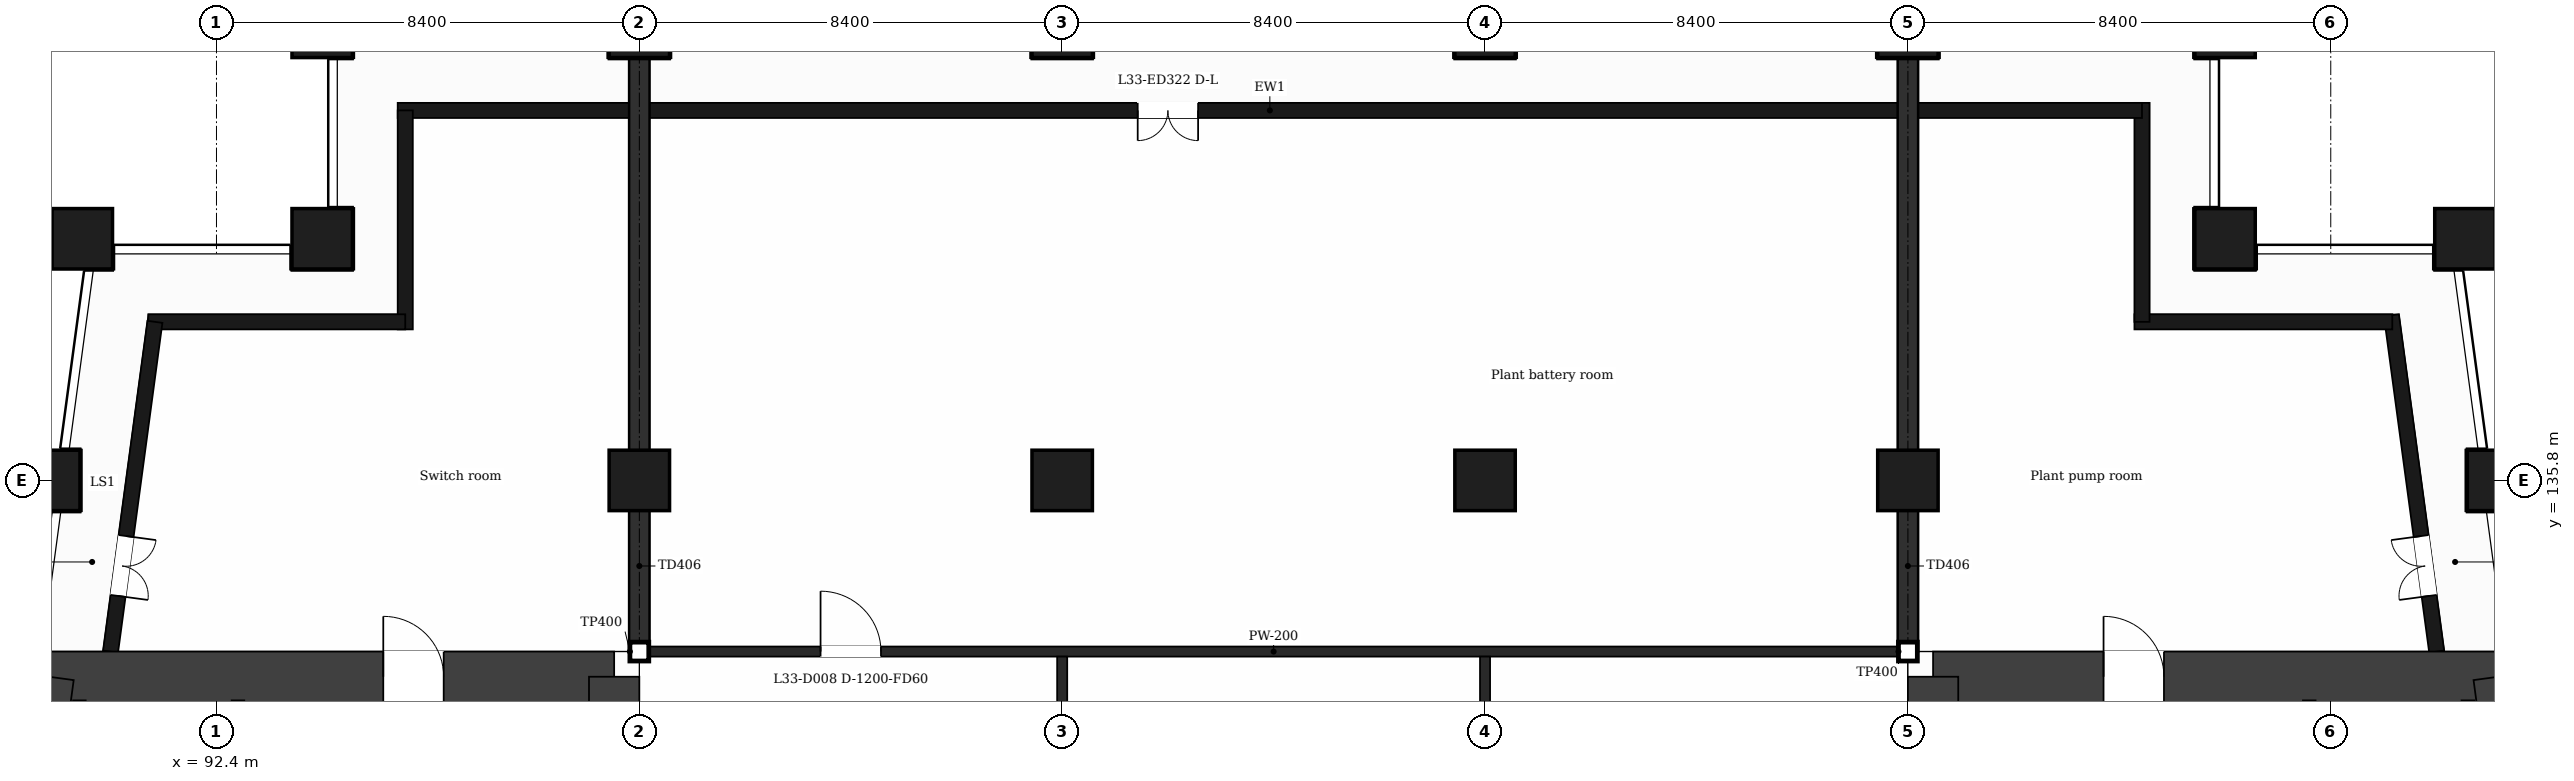
"""IFC4 building model, lengths in metres.
Left out: names, types, materials, properties, quantities, classifications, styles, units other than length and angle.
Written with IfcOpenShell. Run it as: python <this file> out.ifc"""

import sys

from ifc_helpers import new_model, si_unit, direction, frame, frame_2d, origin, origin_2d, place, context, subcontext, project, spatial, rectangle, extrude, element, fill, save


model = new_model("IFC4")
c1 = context("Model", 3, precision=1e-05, world=origin(), true_north=direction((0.0, 1.0)))
c2 = subcontext(c1, "Body", "Model", "MODEL_VIEW")
j1 = project(units=[si_unit("LENGTHUNIT", "METRE"), si_unit("PLANEANGLEUNIT", "RADIAN")], contexts=[c1])
p1 = place(None, origin())
s1 = spatial("IfcSite", under=j1, at=p1, CompositionType="ELEMENT")
p2 = place(p1, origin())
s2 = spatial("IfcBuilding", under=s1, at=p2, CompositionType="ELEMENT")
p3 = place(p2, frame((0.0, 0.0, 142.8)))
s3 = spatial("IfcBuildingStorey", under=s2, at=p3, CompositionType="ELEMENT", Elevation=142.8)
p4 = place(p3, frame((89.068, 131.9, 0.0), z_axis=(0.0, 0.0, 1.0), x_axis=(1.0, 0.0, 0.0)))
e1 = element("IfcWall", 1, at=p4, inside=s3, PredefinedType="SHEAR", context=c2, shape_type="SweptSolid", body=[
    extrude(rectangle(XDim=11.232, YDim=1.0, at=frame_2d((5.616, 0.0))), origin(), (0.0, 0.0, 1.0), 5.0),
])
p5 = place(p4, frame((6.646, 0.0, 0.0)))
e2 = element("IfcOpeningElement", 2, at=p5, cuts=e1, PredefinedType="OPENING", context=c2, shape_type="SweptSolid", body=[
    extrude(rectangle(XDim=1.2, YDim=2.1, at=frame_2d((0.6, 1.05))), frame((0.0, 0.51, 0.0), z_axis=(0.0, -1.0, 0.0), x_axis=(1.0, 0.0, 0.0)), (0.0, 0.0, 1.0), 1.02),
])
p6 = place(p3, frame((100.3, 131.9, 0.0), z_axis=(0.0, 0.0, 1.0), x_axis=(0.0, -1.0, 0.0)))
e3 = element("IfcWall", 3, at=p6, inside=s3, PredefinedType="SHEAR", context=c2, shape_type="SweptSolid", body=[
    extrude(rectangle(XDim=21.0, YDim=1.0, at=frame_2d((10.5, 0.0))), origin(), (0.0, 0.0, 1.0), 5.0),
])
p7 = place(p6, frame((18.7, 0.0, 0.0)))
e4 = element("IfcOpeningElement", 4, at=p7, cuts=e3, PredefinedType="OPENING", context=c2, shape_type="SweptSolid", body=[
    extrude(rectangle(XDim=1.2, YDim=2.1, at=frame_2d((0.6, 1.05))), frame((0.0, 0.51, 0.0), z_axis=(0.0, -1.0, 0.0), x_axis=(1.0, 0.0, 0.0)), (0.0, 0.0, 1.0), 1.02),
])
p8 = place(p6, frame((7.75, 0.0, 0.0)))
e5 = element("IfcOpeningElement", 5, at=p8, cuts=e3, PredefinedType="OPENING", context=c2, shape_type="SweptSolid", body=[
    extrude(rectangle(XDim=1.4, YDim=2.1, at=frame_2d((0.7, 1.05))), frame((0.0, 0.51, 0.0), z_axis=(0.0, -1.0, 0.0), x_axis=(1.0, 0.0, 0.0)), (0.0, 0.0, 1.0), 1.02),
])
p9 = place(p3, frame((86.241, 110.9, 0.0), z_axis=(0.0, 0.0, 1.0), x_axis=(0.133411141623, 0.991060778808, 0.0)))
e6 = element("IfcWall", 6, at=p9, inside=s3, PredefinedType="SHEAR", context=c2, shape_type="SweptSolid", body=[
    extrude(rectangle(XDim=21.189, YDim=1.0, at=frame_2d((10.595, 0.0))), origin(), (0.0, 0.0, 1.0), 5.0),
])
p10 = place(p3, frame((126.5, 131.9, 0.0), z_axis=(0.0, 0.0, 1.0), x_axis=(1.0, 0.0, 0.0)))
e7 = element("IfcWall", 7, at=p10, inside=s3, PredefinedType="SHEAR", context=c2, shape_type="SweptSolid", body=[
    extrude(rectangle(XDim=11.232, YDim=1.0, at=frame_2d((5.616, 0.0))), origin(), (0.0, 0.0, 1.0), 5.0),
])
p11 = place(p10, frame((3.386, 0.0, 0.0)))
e8 = element("IfcOpeningElement", 8, at=p11, cuts=e7, PredefinedType="OPENING", context=c2, shape_type="SweptSolid", body=[
    extrude(rectangle(XDim=1.2, YDim=2.1, at=frame_2d((0.6, 1.05))), frame((0.0, 0.51, 0.0), z_axis=(0.0, -1.0, 0.0), x_axis=(1.0, 0.0, 0.0)), (0.0, 0.0, 1.0), 1.02),
])
p12 = place(p3, frame((137.732, 131.9, 0.0), z_axis=(0.0, 0.0, 1.0), x_axis=(0.133411141623, -0.991060778808, 0.0)))
e9 = element("IfcWall", 9, at=p12, inside=s3, PredefinedType="SHEAR", context=c2, shape_type="SweptSolid", body=[
    extrude(rectangle(XDim=21.189, YDim=1.0, at=frame_2d((10.595, 0.0))), origin(), (0.0, 0.0, 1.0), 5.0),
])
p13 = place(p3, frame((126.5, 110.9, 0.0), z_axis=(0.0, 0.0, 1.0), x_axis=(0.0, 1.0, 0.0)))
e10 = element("IfcWall", 10, at=p13, inside=s3, PredefinedType="SHEAR", context=c2, shape_type="SweptSolid", body=[
    extrude(rectangle(XDim=21.0, YDim=1.0, at=frame_2d((10.5, 0.0))), origin(), (0.0, 0.0, 1.0), 5.0),
])
p14 = place(p13, frame((17.5, 0.0, 0.0)))
e11 = element("IfcOpeningElement", 11, at=p14, cuts=e10, PredefinedType="OPENING", context=c2, shape_type="SweptSolid", body=[
    extrude(rectangle(XDim=1.2, YDim=2.1, at=frame_2d((0.6, 1.05))), frame((0.0, 0.51, 0.0), z_axis=(0.0, -1.0, 0.0), x_axis=(1.0, 0.0, 0.0)), (0.0, 0.0, 1.0), 1.02),
])
p15 = place(p13, frame((11.85, 0.0, 0.0)))
e12 = element("IfcOpeningElement", 12, at=p15, cuts=e10, PredefinedType="OPENING", context=c2, shape_type="SweptSolid", body=[
    extrude(rectangle(XDim=1.4, YDim=2.1, at=frame_2d((0.7, 1.05))), frame((0.0, 0.51, 0.0), z_axis=(0.0, -1.0, 0.0), x_axis=(1.0, 0.0, 0.0)), (0.0, 0.0, 1.0), 1.02),
])
for number, where, z_axis, x_axis in (
    (13, (94.5, 140.6, 0.0), (0.0, 0.0, 1.0), (1.0, 0.0, 0.0)),
    (14, (132.3, 140.6, 0.0), (0.0, 0.0, 1.0), (1.0, 0.0, 0.0)),
    (15, (89.735, 140.6, 0.0), (0.0, 0.0, 1.0), (1.0, 0.0, 0.0)),
    (16, (137.065, 140.6, 0.0), (0.0, 0.0, 1.0), (1.0, 0.0, 0.0)),
    (17, (100.8, 135.8, 0.0), (0.0, 0.0, 1.0), (1.0, 0.0, 0.0)),
    (18, (109.2, 135.8, 0.0), (0.0, 0.0, 1.0), (1.0, 0.0, 0.0)),
    (19, (117.6, 135.8, 0.0), (0.0, 0.0, 1.0), (1.0, 0.0, 0.0)),
    (20, (126.0, 135.8, 0.0), (0.0, 0.0, 1.0), (1.0, 0.0, 0.0)),
    (21, (89.088, 135.8, 0.0), (0.0, 0.0, 1.0), (1.0, 0.0, 0.0)),
    (22, (137.711, 135.8, 0.0), (0.0, 0.0, 1.0), (1.0, 0.0, 0.0)),
    (23, (100.8, 144.8, 0.0), (0.0, 0.0, 1.0), (1.0, 0.0, 0.0)),
    (24, (109.2, 144.8, 0.0), (0.0, 0.0, 1.0), (1.0, 0.0, 0.0)),
    (25, (117.6, 144.8, 0.0), (0.0, 0.0, 1.0), (1.0, 0.0, 0.0)),
    (26, (126.0, 144.8, 0.0), (0.0, 0.0, 1.0), (1.0, 0.0, 0.0)),
    (27, (94.5, 144.8, 0.0), (0.0, 0.0, 1.0), (1.0, 0.0, 0.0)),
    (28, (132.3, 144.8, 0.0), (0.0, 0.0, 1.0), (1.0, 0.0, 0.0)),
):
    element("IfcColumn", number, at=place(p3, frame(where, z_axis=z_axis, x_axis=x_axis)), inside=s3, PredefinedType="COLUMN", context=c2, shape_type="SweptSolid", body=[
        extrude(rectangle(XDim=1.2, YDim=1.2, at=origin_2d()), origin(), (0.0, 0.0, 1.0), 5.0),
    ])
p16 = place(p3, frame((136.504, 132.4, 0.0), z_axis=(0.0, 0.0, 1.0), x_axis=(-0.133399697462, 0.99106231929, 0.0)))
e29 = element("IfcWall", 29, at=p16, inside=s3, PredefinedType="SOLIDWALL", context=c2, shape_type="SweptSolid", body=[
    extrude(rectangle(XDim=6.74, YDim=0.3, at=frame_2d((3.37, 0.0))), origin(), (0.0, 0.0, 1.0), 4.68),
])
p17 = place(p16, frame((1.115, 0.0, 0.0)))
e30 = element("IfcOpeningElement", 30, at=p17, cuts=e29, PredefinedType="OPENING", context=c2, shape_type="SweptSolid", body=[
    extrude(rectangle(XDim=1.2, YDim=2.4, at=frame_2d((0.6, 1.2))), frame((0.0, 0.16, 0.0), z_axis=(0.0, -1.0, 0.0), x_axis=(1.0, 0.0, 0.0)), (0.0, 0.0, 1.0), 0.32),
])
p18 = place(p3, frame((135.623, 138.95, 0.0), z_axis=(0.0, 0.0, 1.0), x_axis=(-1.0, 0.0, 0.0)))
e31 = element("IfcWall", 31, at=p18, inside=s3, PredefinedType="SOLIDWALL", context=c2, shape_type="SweptSolid", body=[
    extrude(rectangle(XDim=5.123, YDim=0.3, at=frame_2d((2.561, 0.0))), origin(), (0.0, 0.0, 1.0), 4.68),
])
p19 = place(p3, frame((130.65, 138.95, 0.0), z_axis=(0.0, 0.0, 1.0), x_axis=(0.0, 1.0, 0.0)))
e32 = element("IfcWall", 32, at=p19, inside=s3, PredefinedType="SOLIDWALL", context=c2, shape_type="SweptSolid", body=[
    extrude(rectangle(XDim=4.35, YDim=0.3, at=frame_2d((2.175, 0.0))), origin(), (0.0, 0.0, 1.0), 4.68),
])
p20 = place(p3, frame((130.65, 143.15, 0.0), z_axis=(0.0, 0.0, 1.0), x_axis=(-1.0, 0.0, 0.0)))
e33 = element("IfcWall", 33, at=p20, inside=s3, PredefinedType="SOLIDWALL", context=c2, shape_type="SweptSolid", body=[
    extrude(rectangle(XDim=34.65, YDim=0.3, at=frame_2d((17.325, 0.0))), origin(), (0.0, 0.0, 1.0), 4.68),
])
p21 = place(p20, frame((18.75, 0.0, 0.0)))
e34 = element("IfcOpeningElement", 34, at=p21, cuts=e33, PredefinedType="OPENING", context=c2, shape_type="SweptSolid", body=[
    extrude(rectangle(XDim=1.2, YDim=2.4, at=frame_2d((0.6, 1.2))), frame((0.0, 0.16, 0.0), z_axis=(0.0, -1.0, 0.0), x_axis=(1.0, 0.0, 0.0)), (0.0, 0.0, 1.0), 0.32),
])
p22 = place(p3, frame((96.15, 143.15, 0.0), z_axis=(0.0, 0.0, 1.0), x_axis=(0.0, -1.0, 0.0)))
e35 = element("IfcWall", 35, at=p22, inside=s3, PredefinedType="SOLIDWALL", context=c2, shape_type="SweptSolid", body=[
    extrude(rectangle(XDim=4.35, YDim=0.3, at=frame_2d((2.175, 0.0))), origin(), (0.0, 0.0, 1.0), 4.68),
])
p23 = place(p3, frame((96.15, 138.95, 0.0), z_axis=(0.0, 0.0, 1.0), x_axis=(-1.0, 0.0, 0.0)))
e36 = element("IfcWall", 36, at=p23, inside=s3, PredefinedType="SOLIDWALL", context=c2, shape_type="SweptSolid", body=[
    extrude(rectangle(XDim=5.104, YDim=0.3, at=frame_2d((2.552, 0.0))), origin(), (0.0, 0.0, 1.0), 4.68),
])
p24 = place(p3, frame((91.177, 138.95, 0.0), z_axis=(0.0, 0.0, 1.0), x_axis=(-0.133426664613, -0.991058689065, 0.0)))
e37 = element("IfcWall", 37, at=p24, inside=s3, PredefinedType="SOLIDWALL", context=c2, shape_type="SweptSolid", body=[
    extrude(rectangle(XDim=6.609, YDim=0.3, at=frame_2d((3.305, 0.0))), origin(), (0.0, 0.0, 1.0), 4.68),
])
p25 = place(p24, frame((4.294, 0.0, 0.0)))
e38 = element("IfcOpeningElement", 38, at=p25, cuts=e37, PredefinedType="OPENING", context=c2, shape_type="SweptSolid", body=[
    extrude(rectangle(XDim=1.2, YDim=2.4, at=frame_2d((0.6, 1.2))), frame((0.0, 0.16, 0.0), z_axis=(0.0, -1.0, 0.0), x_axis=(1.0, 0.0, 0.0)), (0.0, 0.0, 1.0), 0.32),
])
p26 = place(p3, frame((100.7, 132.4, 0.0), z_axis=(0.0, 0.0, 1.0), x_axis=(1.0, 0.0, 0.0)))
e39 = element("IfcWall", 39, at=p26, inside=s3, PredefinedType="PARTITIONING", context=c2, shape_type="SweptSolid", body=[
    extrude(rectangle(XDim=25.4, YDim=0.2, at=frame_2d((12.7, 0.0))), origin(), (0.0, 0.0, 1.0), 4.68),
])
p27 = place(p26, frame((3.7, 0.0, 0.0)))
e40 = element("IfcOpeningElement", 40, at=p27, cuts=e39, PredefinedType="OPENING", context=c2, shape_type="SweptSolid", body=[
    extrude(rectangle(XDim=1.2, YDim=2.1, at=frame_2d((0.6, 1.05))), frame((0.0, 0.11, 0.0), z_axis=(0.0, -1.0, 0.0), x_axis=(1.0, 0.0, 0.0)), (0.0, 0.0, 1.0), 0.22),
])
p28 = place(p3, frame((89.677, 124.575, 0.0), z_axis=(0.0, 0.0, 1.0), x_axis=(0.0, 1.0, 0.0)))
e41 = element("IfcWall", 41, at=p28, inside=s3, PredefinedType="PARTITIONING", context=c2, shape_type="SweptSolid", body=[
    extrude(rectangle(XDim=6.855, YDim=0.25, at=frame_2d((3.427, 0.0))), origin(), (0.0, 0.0, 1.0), 4.68),
])
p29 = place(p3, frame((92.827, 124.575, 0.0), z_axis=(0.0, 0.0, 1.0), x_axis=(0.0, 1.0, 0.0)))
e42 = element("IfcWall", 42, at=p29, inside=s3, PredefinedType="PARTITIONING", context=c2, shape_type="SweptSolid", body=[
    extrude(rectangle(XDim=6.855, YDim=0.25, at=frame_2d((3.427, 0.0))), origin(), (0.0, 0.0, 1.0), 4.68),
])
p30 = place(p29, frame((5.325, 0.0, 0.0)))
e43 = element("IfcOpeningElement", 43, at=p30, cuts=e42, PredefinedType="OPENING", context=c2, shape_type="SweptSolid", body=[
    extrude(rectangle(XDim=1.0, YDim=2.1, at=frame_2d((0.5, 1.05))), frame((0.0, 0.135, 0.0), z_axis=(0.0, -1.0, 0.0), x_axis=(1.0, 0.0, 0.0)), (0.0, 0.0, 1.0), 0.27),
])
p31 = place(p3, frame((100.8, 132.5, 0.0), z_axis=(0.0, 0.0, 1.0), x_axis=(0.0, 1.0, 0.0)))
e44 = element("IfcWall", 44, at=p31, inside=s3, PredefinedType="PARTITIONING", context=c2, shape_type="SweptSolid", body=[
    extrude(rectangle(XDim=10.51, YDim=0.2, at=frame_2d((5.255, 0.0))), origin(), (0.0, 0.0, 1.0), 4.68),
])
for number, where, z_axis, x_axis in (
    (45, (109.2, 124.875, 0.0), (0.0, 0.0, 1.0), (0.0, 1.0, 0.0)),
    (46, (117.6, 124.875, 0.0), (0.0, 0.0, 1.0), (0.0, 1.0, 0.0)),
):
    element("IfcWall", number, at=place(p3, frame(where, z_axis=z_axis, x_axis=x_axis)), inside=s3, PredefinedType="PARTITIONING", context=c2, shape_type="SweptSolid", body=[
        extrude(rectangle(XDim=7.425, YDim=0.2, at=frame_2d((3.712, 0.0))), origin(), (0.0, 0.0, 1.0), 4.68),
    ])
p32 = place(p3, frame((126.0, 132.5, 0.0), z_axis=(0.0, 0.0, 1.0), x_axis=(0.0, 1.0, 0.0)))
e47 = element("IfcWall", 47, at=p32, inside=s3, PredefinedType="PARTITIONING", context=c2, shape_type="SweptSolid", body=[
    extrude(rectangle(XDim=10.51, YDim=0.2, at=frame_2d((5.255, 0.0))), origin(), (0.0, 0.0, 1.0), 4.68),
])
p33 = place(p3, frame((133.973, 124.575, 0.0), z_axis=(0.0, 0.0, 1.0), x_axis=(0.0, 1.0, 0.0)))
e48 = element("IfcWall", 48, at=p33, inside=s3, PredefinedType="PARTITIONING", context=c2, shape_type="SweptSolid", body=[
    extrude(rectangle(XDim=6.855, YDim=0.25, at=frame_2d((3.427, 0.0))), origin(), (0.0, 0.0, 1.0), 4.68),
])
p34 = place(p33, frame((5.325, 0.0, 0.0)))
e49 = element("IfcOpeningElement", 49, at=p34, cuts=e48, PredefinedType="OPENING", context=c2, shape_type="SweptSolid", body=[
    extrude(rectangle(XDim=1.0, YDim=2.1, at=frame_2d((0.5, 1.05))), frame((0.0, 0.135, 0.0), z_axis=(0.0, -1.0, 0.0), x_axis=(1.0, 0.0, 0.0)), (0.0, 0.0, 1.0), 0.27),
])
p35 = place(p3, frame((137.123, 124.575, 0.0), z_axis=(0.0, 0.0, 1.0), x_axis=(0.0, 1.0, 0.0)))
e50 = element("IfcWall", 50, at=p35, inside=s3, PredefinedType="PARTITIONING", context=c2, shape_type="SweptSolid", body=[
    extrude(rectangle(XDim=6.855, YDim=0.25, at=frame_2d((3.427, 0.0))), origin(), (0.0, 0.0, 1.0), 4.68),
])
p36 = place(p17, origin())
e51 = element("IfcDoor", 51, at=p36, inside=s3, OperationType="DOUBLE_DOOR_SINGLE_SWING", PredefinedType="DOOR", context=c2, shape_type="SweptSolid", body=[
    extrude(rectangle(XDim=1.2, YDim=2.4, at=frame_2d((0.6, 1.2))), frame((0.0, 0.025, 0.0), z_axis=(0.0, -1.0, 0.0), x_axis=(1.0, 0.0, 0.0)), (0.0, 0.0, 1.0), 0.05),
])
fill(e30, e51)
p37 = place(p21, origin())
e52 = element("IfcDoor", 52, at=p37, inside=s3, OperationType="DOUBLE_DOOR_SINGLE_SWING", PredefinedType="DOOR", context=c2, shape_type="SweptSolid", body=[
    extrude(rectangle(XDim=1.2, YDim=2.4, at=frame_2d((0.6, 1.2))), frame((0.0, 0.025, 0.0), z_axis=(0.0, -1.0, 0.0), x_axis=(1.0, 0.0, 0.0)), (0.0, 0.0, 1.0), 0.05),
])
fill(e34, e52)
p38 = place(p25, origin())
e53 = element("IfcDoor", 53, at=p38, inside=s3, OperationType="DOUBLE_DOOR_SINGLE_SWING", PredefinedType="DOOR", context=c2, shape_type="SweptSolid", body=[
    extrude(rectangle(XDim=1.2, YDim=2.4, at=frame_2d((0.6, 1.2))), frame((0.0, 0.025, 0.0), z_axis=(0.0, -1.0, 0.0), x_axis=(1.0, 0.0, 0.0)), (0.0, 0.0, 1.0), 0.05),
])
fill(e38, e53)
p39 = place(p27, origin())
e54 = element("IfcDoor", 54, at=p39, inside=s3, OperationType="SINGLE_SWING_LEFT", PredefinedType="DOOR", context=c2, shape_type="SweptSolid", body=[
    extrude(rectangle(XDim=1.2, YDim=2.1, at=frame_2d((0.6, 1.05))), frame((0.0, 0.025, 0.0), z_axis=(0.0, -1.0, 0.0), x_axis=(1.0, 0.0, 0.0)), (0.0, 0.0, 1.0), 0.05),
])
fill(e40, e54)
p40 = place(p5, origin())
e55 = element("IfcDoor", 55, at=p40, inside=s3, OperationType="SINGLE_SWING_LEFT", PredefinedType="DOOR", context=c2, shape_type="SweptSolid", body=[
    extrude(rectangle(XDim=1.2, YDim=2.1, at=frame_2d((0.6, 1.05))), frame((0.0, 0.025, 0.0), z_axis=(0.0, -1.0, 0.0), x_axis=(1.0, 0.0, 0.0)), (0.0, 0.0, 1.0), 0.05),
])
fill(e2, e55)
p41 = place(p11, origin())
e56 = element("IfcDoor", 56, at=p41, inside=s3, OperationType="SINGLE_SWING_LEFT", PredefinedType="DOOR", context=c2, shape_type="SweptSolid", body=[
    extrude(rectangle(XDim=1.2, YDim=2.1, at=frame_2d((0.6, 1.05))), frame((0.0, 0.025, 0.0), z_axis=(0.0, -1.0, 0.0), x_axis=(1.0, 0.0, 0.0)), (0.0, 0.0, 1.0), 0.05),
])
fill(e8, e56)
save(model, sys.argv[1])
